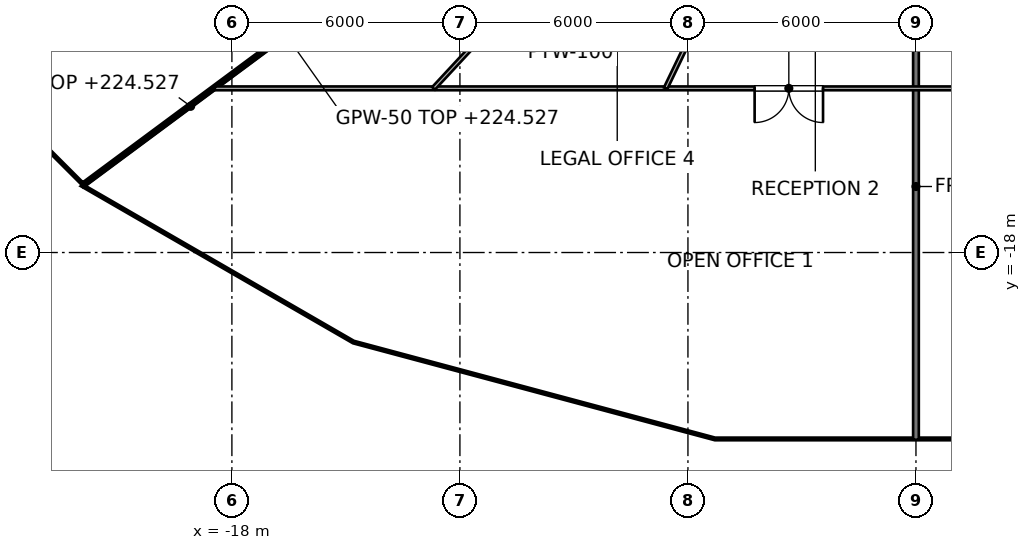
"""IFC4 building model, lengths in metres.
Left out: names, types, materials, properties, quantities, classifications, styles, units other than length and angle.
Written with IfcOpenShell. Run it as: python <this file> out.ifc"""

import sys

from ifc_helpers import new_model, si_unit, direction, frame, frame_2d, origin, place, context, subcontext, project, spatial, rectangle, extrude, element, fill, save


model = new_model("IFC4")
c1 = context("Model", 3, precision=1e-05, world=origin(), true_north=direction((0.0, 1.0)))
c2 = subcontext(c1, "Body", "Model", "MODEL_VIEW")
j1 = project(units=[si_unit("LENGTHUNIT", "METRE"), si_unit("PLANEANGLEUNIT", "RADIAN")], contexts=[c1])
p1 = place(None, origin())
s1 = spatial("IfcSite", under=j1, at=p1, CompositionType="ELEMENT")
p2 = place(p1, origin())
s2 = spatial("IfcBuilding", under=s1, at=p2, CompositionType="ELEMENT")
p3 = place(p2, frame((0.0, 0.0, 221.6)))
s3 = spatial("IfcBuildingStorey", under=s2, at=p3, CompositionType="ELEMENT", Elevation=221.6)
p4 = place(p3, frame((0.0, -22.926, 0.0), z_axis=(0.0, 0.0, 1.0), x_axis=(0.0, 1.0, 0.0)))
e1 = element("IfcWall", 1, at=p4, inside=s3, PredefinedType="PARTITIONING", context=c2, shape_type="SweptSolid", body=[
    extrude(rectangle(XDim=13.326, YDim=0.15, at=frame_2d((6.663, 0.0))), origin(), (0.0, 0.0, 1.0), 2.995),
])
p5 = place(p3, frame((-21.931, -16.263, 0.0), z_axis=(0.0, 0.0, 1.0), x_axis=(0.803271406244, 0.595613169692, 0.0)))
e2 = element("IfcWall", 2, at=p5, inside=s3, PredefinedType="PARTITIONING", context=c2, shape_type="SweptSolid", body=[
    extrude(rectangle(XDim=7.085, YDim=0.05, at=frame_2d((3.542, 0.0))), origin(), (0.0, 0.0, 1.0), 2.927),
])
p6 = place(p3, frame((-18.448, -13.68, 0.0), z_axis=(0.0, 0.0, 1.0), x_axis=(1.0, 0.0, 0.0)))
e3 = element("IfcWall", 3, at=p6, inside=s3, PredefinedType="PARTITIONING", context=c2, shape_type="SweptSolid", body=[
    extrude(rectangle(XDim=40.928, YDim=0.1, at=frame_2d((20.464, 0.0))), origin(), (0.0, 0.0, 1.0), 2.927),
])
p7 = place(p6, frame((14.203, 0.0, 0.0)))
e4 = element("IfcOpeningElement", 4, at=p7, cuts=e3, PredefinedType="OPENING", context=c2, shape_type="SweptSolid", body=[
    extrude(rectangle(XDim=1.8, YDim=2.1, at=frame_2d((0.9, 1.05))), frame((0.0, 0.05, 0.0), z_axis=(0.0, -1.0, 0.0), x_axis=(1.0, 0.0, 0.0)), (0.0, 0.0, 1.0), 0.1),
])
p8 = place(p6, frame((30.025, 0.0, 0.0)))
e5 = element("IfcOpeningElement", 5, at=p8, cuts=e3, PredefinedType="OPENING", context=c2, shape_type="SweptSolid", body=[
    extrude(rectangle(XDim=1.8, YDim=2.1, at=frame_2d((0.9, 1.05))), frame((0.0, 0.05, 0.0), z_axis=(0.0, -1.0, 0.0), x_axis=(1.0, 0.0, 0.0)), (0.0, 0.0, 1.0), 0.1),
])
p9 = place(p3, frame((-12.694, -13.68, 0.0), z_axis=(0.0, 0.0, 1.0), x_axis=(0.680230670979, 0.732998113408, 0.0)))
e6 = element("IfcWall", 6, at=p9, inside=s3, PredefinedType="PARTITIONING", context=c2, shape_type="SweptSolid", body=[
    extrude(rectangle(XDim=5.566, YDim=0.1, at=frame_2d((2.783, 0.0))), origin(), (0.0, 0.0, 1.0), 3.85),
])
p10 = place(p3, frame((-6.588, -13.68, 0.0), z_axis=(0.0, 0.0, 1.0), x_axis=(0.43390153131, 0.900960299418, 0.0)))
e7 = element("IfcWall", 7, at=p10, inside=s3, PredefinedType="PARTITIONING", context=c2, shape_type="SweptSolid", body=[
    extrude(rectangle(XDim=4.528, YDim=0.1, at=frame_2d((2.264, 0.0))), origin(), (0.0, 0.0, 1.0), 3.85),
])
p11 = place(p7, origin())
e8 = element("IfcDoor", 8, at=p11, inside=s3, OperationType="DOUBLE_DOOR_SINGLE_SWING", PredefinedType="DOOR", context=c2, shape_type="SweptSolid", body=[
    extrude(rectangle(XDim=1.8, YDim=2.1, at=frame_2d((0.9, 1.05))), frame((0.0, 0.025, 0.0), z_axis=(0.0, -1.0, 0.0), x_axis=(1.0, 0.0, 0.0)), (0.0, 0.0, 1.0), 0.05),
])
fill(e4, e8)
save(model, sys.argv[1])
